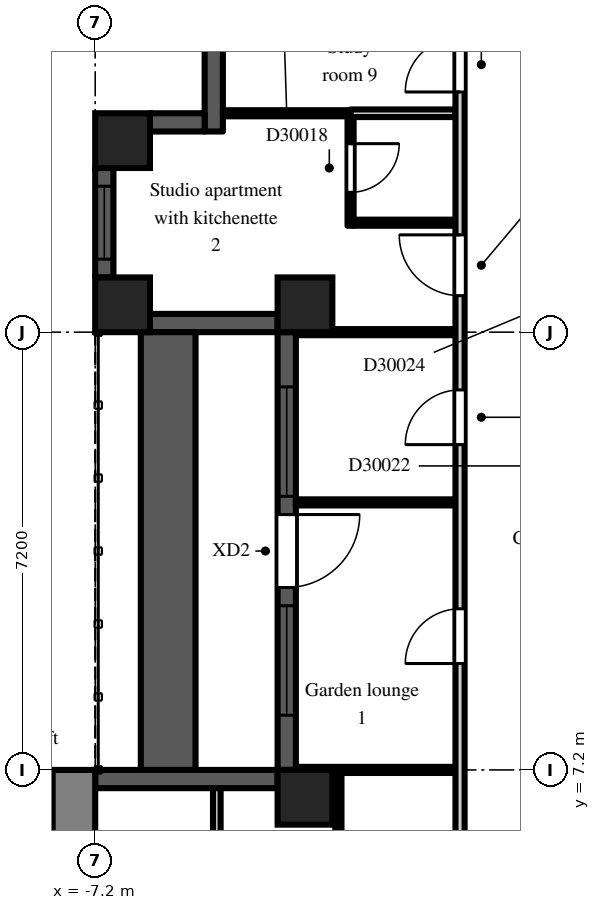
"""IFC4 building model, lengths in metres.
Left out: names, types, materials, properties, quantities, classifications, styles, units other than length and angle.
Written with IfcOpenShell. Run it as: python <this file> out.ifc"""

import sys

from ifc_helpers import new_model, si_unit, direction, frame, frame_2d, origin, origin_2d, place, context, subcontext, project, spatial, rectangle, extrude, element, fill, save


model = new_model("IFC4")
c1 = context("Model", 3, precision=1e-05, world=origin(), true_north=direction((0.0, 1.0)))
c2 = subcontext(c1, "Body", "Model", "MODEL_VIEW")
j1 = project(units=[si_unit("LENGTHUNIT", "METRE"), si_unit("PLANEANGLEUNIT", "RADIAN")], contexts=[c1])
p1 = place(None, origin())
s1 = spatial("IfcSite", under=j1, at=p1, CompositionType="ELEMENT")
p2 = place(p1, origin())
s2 = spatial("IfcBuilding", under=s1, at=p2, CompositionType="ELEMENT")
p3 = place(p2, frame((0.0, 0.0, 207.9)))
s3 = spatial("IfcBuildingStorey", under=s2, at=p3, CompositionType="ELEMENT", Elevation=207.9)
for number, where, z_axis, x_axis in (
    (1, (-6.75, 14.85, 0.0), (0.0, 0.0, 1.0), (1.0, 0.0, 0.0)),
    (2, (-6.75, 17.55, 0.0), (0.0, 0.0, 1.0), (1.0, 0.0, 0.0)),
    (3, (-3.75, 6.75, 0.0), (0.0, 0.0, 1.0), (1.0, 0.0, 0.0)),
    (4, (-3.75, 14.85, 0.0), (0.0, 0.0, 1.0), (1.0, 0.0, 0.0)),
):
    element("IfcColumn", number, at=place(p3, frame(where, z_axis=z_axis, x_axis=x_axis)), inside=s3, PredefinedType="COLUMN", context=c2, shape_type="SweptSolid", body=[
        extrude(rectangle(XDim=0.9, YDim=0.9, at=origin_2d()), origin(), (0.0, 0.0, 1.0), 3.0),
    ])
p4 = place(p3, frame((-5.25, 19.5, 0.0), z_axis=(0.0, 0.0, 1.0), x_axis=(0.0, -1.0, 0.0)))
e5 = element("IfcWall", 5, at=p4, inside=s3, PredefinedType="SOLIDWALL", context=c2, shape_type="SweptSolid", body=[
    extrude(rectangle(XDim=1.8, YDim=0.3, at=frame_2d((0.9, 0.0))), origin(), (0.0, 0.0, 1.0), 2.6),
])
p5 = place(p3, frame((-5.4, 17.85, 0.0), z_axis=(0.0, 0.0, 1.0), x_axis=(-1.0, 0.0, 0.0)))
e6 = element("IfcWall", 6, at=p5, inside=s3, PredefinedType="SOLIDWALL", context=c2, shape_type="SweptSolid", body=[
    extrude(rectangle(XDim=0.9, YDim=0.3, at=frame_2d((0.45, 0.0))), origin(), (0.0, 0.0, 1.0), 2.6),
])
p6 = place(p3, frame((-7.05, 17.1, 0.0), z_axis=(0.0, 0.0, 1.0), x_axis=(0.0, -1.0, 0.0)))
e7 = element("IfcWall", 7, at=p6, inside=s3, PredefinedType="SOLIDWALL", context=c2, shape_type="SweptSolid", body=[
    extrude(rectangle(XDim=1.8, YDim=0.3, at=frame_2d((0.9, 0.0))), origin(), (0.0, 0.0, 1.0), 2.3),
])
p7 = place(p6, frame((0.3, 0.0, 0.2)))
e8 = element("IfcOpeningElement", 8, at=p7, cuts=e7, PredefinedType="OPENING", context=c2, shape_type="SweptSolid", body=[
    extrude(rectangle(XDim=1.2, YDim=1.85, at=frame_2d((0.6, 0.925))), frame((0.0, 0.16, 0.0), z_axis=(0.0, -1.0, 0.0), x_axis=(1.0, 0.0, 0.0)), (0.0, 0.0, 1.0), 0.32),
])
p8 = place(p3, frame((-6.3, 14.55, 0.0), z_axis=(0.0, 0.0, 1.0), x_axis=(1.0, 0.0, 0.0)))
e9 = element("IfcWall", 9, at=p8, inside=s3, PredefinedType="SOLIDWALL", context=c2, shape_type="SweptSolid", body=[
    extrude(rectangle(XDim=2.1, YDim=0.3, at=frame_2d((1.05, 0.0))), origin(), (0.0, 0.0, 1.0), 2.3),
])
p9 = place(p3, frame((-4.05, 14.4, 0.0), z_axis=(0.0, 0.0, 1.0), x_axis=(0.0, -1.0, 0.0)))
e10 = element("IfcWall", 10, at=p9, inside=s3, PredefinedType="SOLIDWALL", context=c2, shape_type="SweptSolid", body=[
    extrude(rectangle(XDim=7.2, YDim=0.3, at=frame_2d((3.6, 0.0))), origin(), (0.0, 0.0, 1.0), 2.3),
])
p10 = place(p9, frame((3.0, 0.0, 0.0)))
e11 = element("IfcOpeningElement", 11, at=p10, cuts=e10, PredefinedType="OPENING", context=c2, shape_type="SweptSolid", body=[
    extrude(rectangle(XDim=1.2, YDim=2.05, at=frame_2d((0.6, 1.025))), frame((0.0, 0.16, 0.0), z_axis=(0.0, -1.0, 0.0), x_axis=(1.0, 0.0, 0.0)), (0.0, 0.0, 1.0), 0.32),
])
p11 = place(p9, frame((0.9, 0.0, 0.2)))
e12 = element("IfcOpeningElement", 12, at=p11, cuts=e10, PredefinedType="OPENING", context=c2, shape_type="SweptSolid", body=[
    extrude(rectangle(XDim=1.8, YDim=1.85, at=frame_2d((0.9, 0.925))), frame((0.0, 0.16, 0.0), z_axis=(0.0, -1.0, 0.0), x_axis=(1.0, 0.0, 0.0)), (0.0, 0.0, 1.0), 0.32),
])
p12 = place(p9, frame((4.5, 0.0, 0.2)))
e13 = element("IfcOpeningElement", 13, at=p12, cuts=e10, PredefinedType="OPENING", context=c2, shape_type="SweptSolid", body=[
    extrude(rectangle(XDim=1.8, YDim=1.85, at=frame_2d((0.9, 0.925))), frame((0.0, 0.16, 0.0), z_axis=(0.0, -1.0, 0.0), x_axis=(1.0, 0.0, 0.0)), (0.0, 0.0, 1.0), 0.32),
])
p13 = place(p3, frame((-4.2, 7.05, 0.0), z_axis=(0.0, 0.0, 1.0), x_axis=(-1.0, 0.0, 0.0)))
e14 = element("IfcWall", 14, at=p13, inside=s3, PredefinedType="SOLIDWALL", context=c2, shape_type="SweptSolid", body=[
    extrude(rectangle(XDim=3.0, YDim=0.3, at=frame_2d((1.5, 0.0))), origin(), (0.0, 0.0, 1.0), 2.3),
])
p14 = place(p3, frame((-6.0, 7.2, 0.0), z_axis=(0.0, 0.0, 1.0), x_axis=(0.0, 1.0, 0.0)))
e15 = element("IfcWall", 15, at=p14, inside=s3, PredefinedType="PARAPET", context=c2, shape_type="SweptSolid", body=[
    extrude(rectangle(XDim=7.2, YDim=0.9, at=frame_2d((3.6, 0.0))), origin(), (0.0, 0.0, 1.0), 0.8),
])
p15 = place(p3, frame((-7.55, -7.2, 0.0), z_axis=(0.0, 0.0, 1.0), x_axis=(0.0, 1.0, 0.0)))
e16 = element("IfcWall", 16, at=p15, inside=s3, PredefinedType="SHEAR", context=c2, shape_type="SweptSolid", body=[
    extrude(rectangle(XDim=14.4, YDim=0.7, at=frame_2d((7.2, 0.0))), origin(), (0.0, 0.0, 1.0), 2.6),
])
p16 = place(p15, frame((6.0, 0.0, 0.0)))
e17 = element("IfcOpeningElement", 17, at=p16, cuts=e16, PredefinedType="OPENING", context=c2, shape_type="SweptSolid", body=[
    extrude(rectangle(XDim=2.4, YDim=2.2, at=frame_2d((1.2, 1.1))), frame((0.0, 0.36, 0.0), z_axis=(0.0, -1.0, 0.0), x_axis=(1.0, 0.0, 0.0)), (0.0, 0.0, 1.0), 0.72),
])
p17 = place(p3, frame((-5.2, 1.275, 0.0), z_axis=(0.0, 0.0, 1.0), x_axis=(0.0, 1.0, 0.0)))
e18 = element("IfcWall", 18, at=p17, inside=s3, PredefinedType="PARTITIONING", context=c2, shape_type="SweptSolid", body=[
    extrude(rectangle(XDim=5.625, YDim=0.125, at=frame_2d((2.812, 0.0))), origin(), (0.0, 0.0, 1.0), 2.6),
])
p18 = place(p3, frame((-5.1, 18.0, 0.0), z_axis=(0.0, 0.0, 1.0), x_axis=(1.0, 0.0, 0.0)))
e19 = element("IfcWall", 19, at=p18, inside=s3, PredefinedType="PARTITIONING", context=c2, shape_type="SweptSolid", body=[
    extrude(rectangle(XDim=2.1, YDim=0.1, at=frame_2d((1.05, 0.0))), origin(), (0.0, 0.0, 1.0), 2.6),
])
for number, where, z_axis, x_axis in (
    (20, (-3.9, 7.2, 0.0), (0.0, 0.0, 1.0), (1.0, 0.0, 0.0)),
    (21, (-3.9, 11.6, 0.0), (0.0, 0.0, 1.0), (1.0, 0.0, 0.0)),
    (22, (-3.9, 14.4, 0.0), (0.0, 0.0, 1.0), (1.0, 0.0, 0.0)),
):
    element("IfcWall", number, at=place(p3, frame(where, z_axis=z_axis, x_axis=x_axis)), inside=s3, PredefinedType="PARTITIONING", context=c2, shape_type="SweptSolid", body=[
        extrude(rectangle(XDim=2.625, YDim=0.1, at=frame_2d((1.312, 0.0))), origin(), (0.0, 0.0, 1.0), 2.6),
    ])
p19 = place(p3, frame((-3.2, 1.275, 0.0), z_axis=(0.0, 0.0, 1.0), x_axis=(0.0, 1.0, 0.0)))
e23 = element("IfcWall", 23, at=p19, inside=s3, PredefinedType="PARTITIONING", context=c2, shape_type="SweptSolid", body=[
    extrude(rectangle(XDim=5.875, YDim=0.1, at=frame_2d((2.938, 0.0))), origin(), (0.0, 0.0, 1.0), 2.6),
])
p20 = place(p3, frame((-3.0, 16.15, 0.0), z_axis=(0.0, 0.0, 1.0), x_axis=(0.0, 1.0, 0.0)))
e24 = element("IfcWall", 24, at=p20, inside=s3, PredefinedType="PARTITIONING", context=c2, shape_type="SweptSolid", body=[
    extrude(rectangle(XDim=1.788, YDim=0.1, at=frame_2d((0.894, 0.0))), origin(), (0.0, 0.0, 1.0), 2.6),
])
p21 = place(p20, frame((0.55, 0.0, 0.0)))
e25 = element("IfcOpeningElement", 25, at=p21, cuts=e24, PredefinedType="OPENING", context=c2, shape_type="SweptSolid", body=[
    extrude(rectangle(XDim=0.8, YDim=2.1, at=frame_2d((0.4, 1.05))), frame((0.0, 0.06, 0.0), z_axis=(0.0, -1.0, 0.0), x_axis=(1.0, 0.0, 0.0)), (0.0, 0.0, 1.0), 0.12),
])
p22 = place(p3, frame((-2.95, 16.2, 0.0), z_axis=(0.0, 0.0, 1.0), x_axis=(1.0, 0.0, 0.0)))
e26 = element("IfcWall", 26, at=p22, inside=s3, PredefinedType="PARTITIONING", context=c2, shape_type="SweptSolid", body=[
    extrude(rectangle(XDim=1.675, YDim=0.1, at=frame_2d((0.837, 0.0))), origin(), (0.0, 0.0, 1.0), 2.6),
])
p23 = place(p3, frame((-3.0, 18.0, 0.0), z_axis=(0.0, 0.0, 1.0), x_axis=(1.0, 0.0, 0.0)))
e27 = element("IfcWall", 27, at=p23, inside=s3, PredefinedType="PARTITIONING", context=c2, shape_type="SweptSolid", body=[
    extrude(rectangle(XDim=1.725, YDim=0.125, at=frame_2d((0.863, 0.0))), origin(), (0.0, 0.0, 1.0), 2.6),
])
p24 = place(p3, frame((-1.2, 1.275, 0.0), z_axis=(0.0, 0.0, 1.0), x_axis=(0.0, 1.0, 0.0)))
e28 = element("IfcWall", 28, at=p24, inside=s3, PredefinedType="PARTITIONING", context=c2, shape_type="SweptSolid", body=[
    extrude(rectangle(XDim=18.25, YDim=0.15, at=frame_2d((9.125, 0.0))), origin(), (0.0, 0.0, 1.0), 2.6),
])
p25 = place(p24, frame((2.475, 0.0, 0.0)))
e29 = element("IfcOpeningElement", 29, at=p25, cuts=e28, PredefinedType="OPENING", context=c2, shape_type="SweptSolid", body=[
    extrude(rectangle(XDim=0.9, YDim=2.1, at=frame_2d((0.45, 1.05))), frame((0.0, 0.085, 0.0), z_axis=(0.0, -1.0, 0.0), x_axis=(1.0, 0.0, 0.0)), (0.0, 0.0, 1.0), 0.17),
])
p26 = place(p24, frame((11.275, 0.0, 0.0)))
e30 = element("IfcOpeningElement", 30, at=p26, cuts=e28, PredefinedType="OPENING", context=c2, shape_type="SweptSolid", body=[
    extrude(rectangle(XDim=0.9, YDim=2.1, at=frame_2d((0.45, 1.05))), frame((0.0, 0.085, 0.0), z_axis=(0.0, -1.0, 0.0), x_axis=(1.0, 0.0, 0.0)), (0.0, 0.0, 1.0), 0.17),
])
p27 = place(p24, frame((7.675, 0.0, 0.0)))
e31 = element("IfcOpeningElement", 31, at=p27, cuts=e28, PredefinedType="OPENING", context=c2, shape_type="SweptSolid", body=[
    extrude(rectangle(XDim=0.9, YDim=2.1, at=frame_2d((0.45, 1.05))), frame((0.0, 0.085, 0.0), z_axis=(0.0, -1.0, 0.0), x_axis=(1.0, 0.0, 0.0)), (0.0, 0.0, 1.0), 0.17),
])
p28 = place(p24, frame((13.725, 0.0, 0.0)))
e32 = element("IfcOpeningElement", 32, at=p28, cuts=e28, PredefinedType="OPENING", context=c2, shape_type="SweptSolid", body=[
    extrude(rectangle(XDim=1.0, YDim=2.1, at=frame_2d((0.5, 1.05))), frame((0.0, 0.085, 0.0), z_axis=(0.0, -1.0, 0.0), x_axis=(1.0, 0.0, 0.0)), (0.0, 0.0, 1.0), 0.17),
])
p29 = place(p24, frame((17.075, 0.0, 0.0)))
e33 = element("IfcOpeningElement", 33, at=p29, cuts=e28, PredefinedType="OPENING", context=c2, shape_type="SweptSolid", body=[
    extrude(rectangle(XDim=0.9, YDim=2.1, at=frame_2d((0.45, 1.05))), frame((0.0, 0.085, 0.0), z_axis=(0.0, -1.0, 0.0), x_axis=(1.0, 0.0, 0.0)), (0.0, 0.0, 1.0), 0.17),
])
p30 = place(p7, origin())
e34 = element("IfcWindow", 34, at=p30, inside=s3, PartitioningType="SINGLE_PANEL", PredefinedType="WINDOW", context=c2, shape_type="SweptSolid", body=[
    extrude(rectangle(XDim=1.2, YDim=1.85, at=frame_2d((0.6, 0.925))), frame((0.0, 0.03, 0.0), z_axis=(0.0, -1.0, 0.0), x_axis=(1.0, 0.0, 0.0)), (0.0, 0.0, 1.0), 0.06),
])
fill(e8, e34)
p31 = place(p10, origin())
e35 = element("IfcDoor", 35, at=p31, inside=s3, OperationType="SINGLE_SWING_LEFT", PredefinedType="DOOR", context=c2, shape_type="SweptSolid", body=[
    extrude(rectangle(XDim=1.2, YDim=2.05, at=frame_2d((0.6, 1.025))), frame((0.0, 0.025, 0.0), z_axis=(0.0, -1.0, 0.0), x_axis=(1.0, 0.0, 0.0)), (0.0, 0.0, 1.0), 0.05),
])
fill(e11, e35)
p32 = place(p11, origin())
e36 = element("IfcWindow", 36, at=p32, inside=s3, PartitioningType="SINGLE_PANEL", PredefinedType="WINDOW", context=c2, shape_type="SweptSolid", body=[
    extrude(rectangle(XDim=1.8, YDim=1.85, at=frame_2d((0.9, 0.925))), frame((0.0, 0.03, 0.0), z_axis=(0.0, -1.0, 0.0), x_axis=(1.0, 0.0, 0.0)), (0.0, 0.0, 1.0), 0.06),
])
fill(e12, e36)
p33 = place(p12, origin())
e37 = element("IfcWindow", 37, at=p33, inside=s3, PartitioningType="SINGLE_PANEL", PredefinedType="WINDOW", context=c2, shape_type="SweptSolid", body=[
    extrude(rectangle(XDim=1.8, YDim=1.85, at=frame_2d((0.9, 0.925))), frame((0.0, 0.03, 0.0), z_axis=(0.0, -1.0, 0.0), x_axis=(1.0, 0.0, 0.0)), (0.0, 0.0, 1.0), 0.06),
])
fill(e13, e37)
p34 = place(p26, origin())
e38 = element("IfcDoor", 38, at=p34, inside=s3, OperationType="SINGLE_SWING_LEFT", PredefinedType="DOOR", context=c2, shape_type="SweptSolid", body=[
    extrude(rectangle(XDim=0.9, YDim=2.1, at=frame_2d((0.45, 1.05))), frame((0.0, 0.025, 0.0), z_axis=(0.0, -1.0, 0.0), x_axis=(1.0, 0.0, 0.0)), (0.0, 0.0, 1.0), 0.05),
])
fill(e30, e38)
p35 = place(p27, origin())
e39 = element("IfcDoor", 39, at=p35, inside=s3, OperationType="SINGLE_SWING_LEFT", PredefinedType="DOOR", context=c2, shape_type="SweptSolid", body=[
    extrude(rectangle(XDim=0.9, YDim=2.1, at=frame_2d((0.45, 1.05))), frame((0.0, 0.025, 0.0), z_axis=(0.0, -1.0, 0.0), x_axis=(1.0, 0.0, 0.0)), (0.0, 0.0, 1.0), 0.05),
])
fill(e31, e39)
p36 = place(p21, frame((0.8, 0.0, 0.0), z_axis=(0.0, 0.0, 1.0), x_axis=(-1.0, 0.0, 0.0)))
e40 = element("IfcDoor", 40, at=p36, inside=s3, OperationType="SINGLE_SWING_LEFT", PredefinedType="DOOR", context=c2, shape_type="SweptSolid", body=[
    extrude(rectangle(XDim=0.8, YDim=2.1, at=frame_2d((0.4, 1.05))), frame((0.0, 0.025, 0.0), z_axis=(0.0, -1.0, 0.0), x_axis=(1.0, 0.0, 0.0)), (0.0, 0.0, 1.0), 0.05),
])
fill(e25, e40)
p37 = place(p28, origin())
e41 = element("IfcDoor", 41, at=p37, inside=s3, OperationType="SINGLE_SWING_RIGHT", PredefinedType="DOOR", context=c2, shape_type="SweptSolid", body=[
    extrude(rectangle(XDim=1.0, YDim=2.1, at=frame_2d((0.5, 1.05))), frame((0.0, 0.025, 0.0), z_axis=(0.0, -1.0, 0.0), x_axis=(1.0, 0.0, 0.0)), (0.0, 0.0, 1.0), 0.05),
])
fill(e32, e41)
p38 = place(p29, origin())
e42 = element("IfcDoor", 42, at=p38, inside=s3, OperationType="SINGLE_SWING_LEFT", PredefinedType="DOOR", context=c2, shape_type="SweptSolid", body=[
    extrude(rectangle(XDim=0.9, YDim=2.1, at=frame_2d((0.45, 1.05))), frame((0.0, 0.025, 0.0), z_axis=(0.0, -1.0, 0.0), x_axis=(1.0, 0.0, 0.0)), (0.0, 0.0, 1.0), 0.05),
])
fill(e33, e42)
save(model, sys.argv[1])
